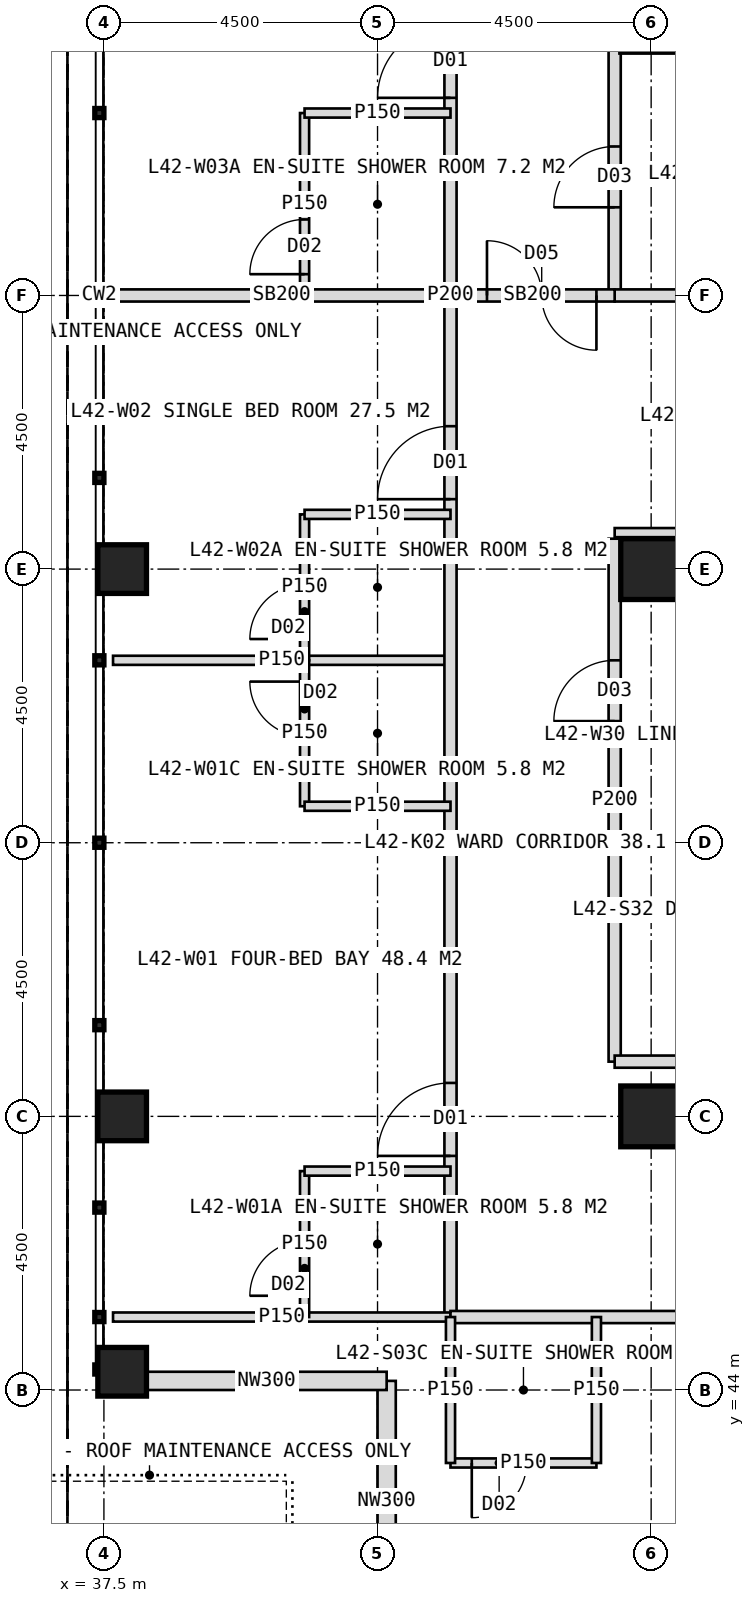
"""IFC4 building model, lengths in metres.
Left out: names, types, materials, properties, quantities, classifications, styles, units other than length and angle.
Written with IfcOpenShell. Run it as: python <this file> out.ifc"""

import sys

from ifc_helpers import new_model, si_unit, direction, frame, frame_2d, origin, origin_2d, place, context, subcontext, project, spatial, rectangle, hollow_rectangle, extrude, element, fill, save


model = new_model("IFC4")
c1 = context("Model", 3, precision=1e-05, world=origin(), true_north=direction((0.0, 1.0)))
c2 = subcontext(c1, "Body", "Model", "MODEL_VIEW")
j1 = project(units=[si_unit("LENGTHUNIT", "METRE"), si_unit("PLANEANGLEUNIT", "RADIAN")], contexts=[c1])
p1 = place(None, origin())
s1 = spatial("IfcSite", under=j1, at=p1, CompositionType="ELEMENT")
p2 = place(p1, origin())
s2 = spatial("IfcBuilding", under=s1, at=p2, CompositionType="ELEMENT")
p3 = place(p2, frame((0.0, 0.0, 177.0)))
s3 = spatial("IfcBuildingStorey", under=s2, at=p3, CompositionType="ELEMENT", Elevation=177.0)
for number, where, z_axis, x_axis in (
    (1, (46.5, 48.5, 0.0), (0.0, 0.0, 1.0), (1.0, 0.0, 0.0)),
    (2, (46.5, 57.5, 0.0), (0.0, 0.0, 1.0), (1.0, 0.0, 0.0)),
):
    element("IfcColumn", number, at=place(p3, frame(where, z_axis=z_axis, x_axis=x_axis)), inside=s3, PredefinedType="COLUMN", context=c2, shape_type="SweptSolid", body=[
        extrude(hollow_rectangle(XDim=1.0, YDim=1.0, WallThickness=0.1, at=origin_2d()), origin(), (0.0, 0.0, 1.0), 4.0),
    ])
for number, where, z_axis, x_axis in (
    (3, (37.8, 44.3, 0.0), (0.0, 0.0, 1.0), (1.0, 0.0, 0.0)),
    (4, (37.8, 48.5, 0.0), (0.0, 0.0, 1.0), (1.0, 0.0, 0.0)),
    (5, (37.8, 57.5, 0.0), (0.0, 0.0, 1.0), (1.0, 0.0, 0.0)),
):
    element("IfcColumn", number, at=place(p3, frame(where, z_axis=z_axis, x_axis=x_axis)), inside=s3, PredefinedType="COLUMN", context=c2, shape_type="SweptSolid", body=[
        extrude(hollow_rectangle(XDim=0.8, YDim=0.8, WallThickness=0.08, at=origin_2d()), origin(), (0.0, 0.0, 1.0), 4.0),
    ])
for number, where, z_axis, x_axis in (
    (6, (42.15, 40.2, 0.0), (0.0, 0.0, 1.0), (0.0, 1.0, 0.0)),
    (7, (42.15, 44.15, 0.0), (0.0, 0.0, 1.0), (-1.0, 0.0, 0.0)),
):
    element("IfcWall", number, at=place(p3, frame(where, z_axis=z_axis, x_axis=x_axis)), inside=s3, PredefinedType="ELEMENTEDWALL", context=c2, shape_type="SweptSolid", body=[
        extrude(rectangle(XDim=3.95, YDim=0.3, at=frame_2d((1.975, 0.0))), origin(), (0.0, 0.0, 1.0), 2.85),
    ])
p4 = place(p3, frame((43.2, 56.0, 0.0), z_axis=(0.0, 0.0, 1.0), x_axis=(-1.0, 0.0, 0.0)))
e8 = element("IfcWall", 8, at=p4, inside=s3, PredefinedType="PARTITIONING", context=c2, shape_type="SweptSolid", body=[
    extrude(rectangle(XDim=5.55, YDim=0.15, at=frame_2d((2.775, 0.0))), origin(), (0.0, 0.0, 1.0), 3.75),
])
p5 = place(p3, frame((43.2, 62.0, 0.0), z_axis=(0.0, 0.0, 1.0), x_axis=(-1.0, 0.0, 0.0)))
e9 = element("IfcWall", 9, at=p5, inside=s3, PredefinedType="SOLIDWALL", context=c2, shape_type="SweptSolid", body=[
    extrude(rectangle(XDim=5.55, YDim=0.2, at=frame_2d((2.775, 0.0))), origin(), (0.0, 0.0, 1.0), 2.95),
])
p6 = place(p3, frame((43.2, 45.2, 0.0), z_axis=(0.0, 0.0, 1.0), x_axis=(0.0, 1.0, 0.0)))
e10 = element("IfcWall", 10, at=p6, inside=s3, PredefinedType="PARTITIONING", context=c2, shape_type="SweptSolid", body=[
    extrude(rectangle(XDim=33.6, YDim=0.2, at=frame_2d((16.8, 0.0))), origin(), (0.0, 0.0, 1.0), 3.75),
])
p7 = place(p6, frame((2.65, 0.0, 0.0)))
e11 = element("IfcOpeningElement", 11, at=p7, cuts=e10, PredefinedType="OPENING", context=c2, shape_type="SweptSolid", body=[
    extrude(rectangle(XDim=1.2, YDim=2.2, at=frame_2d((0.6, 1.1))), frame((0.0, 0.11, 0.0), z_axis=(0.0, -1.0, 0.0), x_axis=(1.0, 0.0, 0.0)), (0.0, 0.0, 1.0), 0.22),
])
p8 = place(p6, frame((13.45, 0.0, 0.0)))
e12 = element("IfcOpeningElement", 12, at=p8, cuts=e10, PredefinedType="OPENING", context=c2, shape_type="SweptSolid", body=[
    extrude(rectangle(XDim=1.2, YDim=2.2, at=frame_2d((0.6, 1.1))), frame((0.0, 0.11, 0.0), z_axis=(0.0, -1.0, 0.0), x_axis=(1.0, 0.0, 0.0)), (0.0, 0.0, 1.0), 0.22),
])
p9 = place(p6, frame((20.05, 0.0, 0.0)))
e13 = element("IfcOpeningElement", 13, at=p9, cuts=e10, PredefinedType="OPENING", context=c2, shape_type="SweptSolid", body=[
    extrude(rectangle(XDim=1.2, YDim=2.2, at=frame_2d((0.6, 1.1))), frame((0.0, 0.11, 0.0), z_axis=(0.0, -1.0, 0.0), x_axis=(1.0, 0.0, 0.0)), (0.0, 0.0, 1.0), 0.22),
])
p10 = place(p6, frame((29.05, 0.0, 0.0)))
e14 = element("IfcOpeningElement", 14, at=p10, cuts=e10, PredefinedType="OPENING", context=c2, shape_type="SweptSolid", body=[
    extrude(rectangle(XDim=1.2, YDim=2.2, at=frame_2d((0.6, 1.1))), frame((0.0, 0.11, 0.0), z_axis=(0.0, -1.0, 0.0), x_axis=(1.0, 0.0, 0.0)), (0.0, 0.0, 1.0), 0.22),
])
p11 = place(p3, frame((43.2, 45.2, 0.0), z_axis=(0.0, 0.0, 1.0), x_axis=(-1.0, 0.0, 0.0)))
e15 = element("IfcWall", 15, at=p11, inside=s3, PredefinedType="PARTITIONING", context=c2, shape_type="SweptSolid", body=[
    extrude(rectangle(XDim=5.55, YDim=0.15, at=frame_2d((2.775, 0.0))), origin(), (0.0, 0.0, 1.0), 3.75),
])
p12 = place(p3, frame((40.8, 45.2, 0.0), z_axis=(0.0, 0.0, 1.0), x_axis=(0.0, 1.0, 0.0)))
e16 = element("IfcWall", 16, at=p12, inside=s3, PredefinedType="PARTITIONING", context=c2, shape_type="SweptSolid", body=[
    extrude(rectangle(XDim=2.4, YDim=0.15, at=frame_2d((1.2, 0.0))), origin(), (0.0, 0.0, 1.0), 3.75),
])
p13 = place(p12, frame((0.35, 0.0, 0.0)))
e17 = element("IfcOpeningElement", 17, at=p13, cuts=e16, PredefinedType="OPENING", context=c2, shape_type="SweptSolid", body=[
    extrude(rectangle(XDim=0.9, YDim=2.1, at=frame_2d((0.45, 1.05))), frame((0.0, 0.085, 0.0), z_axis=(0.0, -1.0, 0.0), x_axis=(1.0, 0.0, 0.0)), (0.0, 0.0, 1.0), 0.17),
])
p14 = place(p3, frame((43.2, 47.6, 0.0), z_axis=(0.0, 0.0, 1.0), x_axis=(-1.0, 0.0, 0.0)))
e18 = element("IfcWall", 18, at=p14, inside=s3, PredefinedType="PARTITIONING", context=c2, shape_type="SweptSolid", body=[
    extrude(rectangle(XDim=2.4, YDim=0.15, at=frame_2d((1.2, 0.0))), origin(), (0.0, 0.0, 1.0), 3.75),
])
p15 = place(p3, frame((40.8, 53.6, 0.0), z_axis=(0.0, 0.0, 1.0), x_axis=(0.0, 1.0, 0.0)))
e19 = element("IfcWall", 19, at=p15, inside=s3, PredefinedType="PARTITIONING", context=c2, shape_type="SweptSolid", body=[
    extrude(rectangle(XDim=2.4, YDim=0.15, at=frame_2d((1.2, 0.0))), origin(), (0.0, 0.0, 1.0), 3.75),
])
p16 = place(p15, frame((1.15, 0.0, 0.0)))
e20 = element("IfcOpeningElement", 20, at=p16, cuts=e19, PredefinedType="OPENING", context=c2, shape_type="SweptSolid", body=[
    extrude(rectangle(XDim=0.9, YDim=2.1, at=frame_2d((0.45, 1.05))), frame((0.0, 0.085, 0.0), z_axis=(0.0, -1.0, 0.0), x_axis=(1.0, 0.0, 0.0)), (0.0, 0.0, 1.0), 0.17),
])
p17 = place(p3, frame((43.2, 53.6, 0.0), z_axis=(0.0, 0.0, 1.0), x_axis=(-1.0, 0.0, 0.0)))
e21 = element("IfcWall", 21, at=p17, inside=s3, PredefinedType="PARTITIONING", context=c2, shape_type="SweptSolid", body=[
    extrude(rectangle(XDim=2.4, YDim=0.15, at=frame_2d((1.2, 0.0))), origin(), (0.0, 0.0, 1.0), 3.75),
])
p18 = place(p3, frame((40.8, 56.0, 0.0), z_axis=(0.0, 0.0, 1.0), x_axis=(0.0, 1.0, 0.0)))
e22 = element("IfcWall", 22, at=p18, inside=s3, PredefinedType="PARTITIONING", context=c2, shape_type="SweptSolid", body=[
    extrude(rectangle(XDim=2.4, YDim=0.15, at=frame_2d((1.2, 0.0))), origin(), (0.0, 0.0, 1.0), 3.75),
])
p19 = place(p18, frame((0.35, 0.0, 0.0)))
e23 = element("IfcOpeningElement", 23, at=p19, cuts=e22, PredefinedType="OPENING", context=c2, shape_type="SweptSolid", body=[
    extrude(rectangle(XDim=0.9, YDim=2.1, at=frame_2d((0.45, 1.05))), frame((0.0, 0.085, 0.0), z_axis=(0.0, -1.0, 0.0), x_axis=(1.0, 0.0, 0.0)), (0.0, 0.0, 1.0), 0.17),
])
p20 = place(p3, frame((43.2, 58.4, 0.0), z_axis=(0.0, 0.0, 1.0), x_axis=(-1.0, 0.0, 0.0)))
e24 = element("IfcWall", 24, at=p20, inside=s3, PredefinedType="PARTITIONING", context=c2, shape_type="SweptSolid", body=[
    extrude(rectangle(XDim=2.4, YDim=0.15, at=frame_2d((1.2, 0.0))), origin(), (0.0, 0.0, 1.0), 3.75),
])
p21 = place(p3, frame((40.8, 62.0, 0.0), z_axis=(0.0, 0.0, 1.0), x_axis=(0.0, 1.0, 0.0)))
e25 = element("IfcWall", 25, at=p21, inside=s3, PredefinedType="PARTITIONING", context=c2, shape_type="SweptSolid", body=[
    extrude(rectangle(XDim=3.0, YDim=0.15, at=frame_2d((1.5, 0.0))), origin(), (0.0, 0.0, 1.0), 3.75),
])
p22 = place(p21, frame((0.35, 0.0, 0.0)))
e26 = element("IfcOpeningElement", 26, at=p22, cuts=e25, PredefinedType="OPENING", context=c2, shape_type="SweptSolid", body=[
    extrude(rectangle(XDim=0.9, YDim=2.1, at=frame_2d((0.45, 1.05))), frame((0.0, 0.085, 0.0), z_axis=(0.0, -1.0, 0.0), x_axis=(1.0, 0.0, 0.0)), (0.0, 0.0, 1.0), 0.17),
])
p23 = place(p3, frame((43.2, 65.0, 0.0), z_axis=(0.0, 0.0, 1.0), x_axis=(-1.0, 0.0, 0.0)))
e27 = element("IfcWall", 27, at=p23, inside=s3, PredefinedType="PARTITIONING", context=c2, shape_type="SweptSolid", body=[
    extrude(rectangle(XDim=2.4, YDim=0.15, at=frame_2d((1.2, 0.0))), origin(), (0.0, 0.0, 1.0), 3.75),
])
p24 = place(p3, frame((51.0, 53.0, 0.0), z_axis=(0.0, 0.0, 1.0), x_axis=(-1.0, 0.0, 0.0)))
e28 = element("IfcWall", 28, at=p24, inside=s3, PredefinedType="PARTITIONING", context=c2, shape_type="SweptSolid", body=[
    extrude(rectangle(XDim=5.1, YDim=0.15, at=frame_2d((2.55, 0.0))), origin(), (0.0, 0.0, 1.0), 3.75),
])
p25 = place(p3, frame((45.9, 49.4, 0.0), z_axis=(0.0, 0.0, 1.0), x_axis=(0.0, 1.0, 0.0)))
e29 = element("IfcWall", 29, at=p25, inside=s3, PredefinedType="PARTITIONING", context=c2, shape_type="SweptSolid", body=[
    extrude(rectangle(XDim=8.6, YDim=0.2, at=frame_2d((4.3, 0.0))), origin(), (0.0, 0.0, 1.0), 3.75),
])
p26 = place(p25, frame((5.6, 0.0, 0.0)))
e30 = element("IfcOpeningElement", 30, at=p26, cuts=e29, PredefinedType="OPENING", context=c2, shape_type="SweptSolid", body=[
    extrude(rectangle(XDim=1.0, YDim=2.1, at=frame_2d((0.5, 1.05))), frame((0.0, 0.11, 0.0), z_axis=(0.0, -1.0, 0.0), x_axis=(1.0, 0.0, 0.0)), (0.0, 0.0, 1.0), 0.22),
])
p27 = place(p3, frame((45.9, 62.0, 0.0), z_axis=(0.0, 0.0, 1.0), x_axis=(0.0, 1.0, 0.0)))
e31 = element("IfcWall", 31, at=p27, inside=s3, PredefinedType="PARTITIONING", context=c2, shape_type="SweptSolid", body=[
    extrude(rectangle(XDim=14.1, YDim=0.2, at=frame_2d((7.05, 0.0))), origin(), (0.0, 0.0, 1.0), 3.75),
])
p28 = place(p27, frame((1.45, 0.0, 0.0)))
e32 = element("IfcOpeningElement", 32, at=p28, cuts=e31, PredefinedType="OPENING", context=c2, shape_type="SweptSolid", body=[
    extrude(rectangle(XDim=1.0, YDim=2.1, at=frame_2d((0.5, 1.05))), frame((0.0, 0.11, 0.0), z_axis=(0.0, -1.0, 0.0), x_axis=(1.0, 0.0, 0.0)), (0.0, 0.0, 1.0), 0.22),
])
p29 = place(p27, frame((10.3, 0.0, 0.0)))
e33 = element("IfcOpeningElement", 33, at=p29, cuts=e31, PredefinedType="OPENING", context=c2, shape_type="SweptSolid", body=[
    extrude(rectangle(XDim=1.0, YDim=2.1, at=frame_2d((0.5, 1.05))), frame((0.0, 0.11, 0.0), z_axis=(0.0, -1.0, 0.0), x_axis=(1.0, 0.0, 0.0)), (0.0, 0.0, 1.0), 0.22),
])
p30 = place(p3, frame((51.0, 58.1, 0.0), z_axis=(0.0, 0.0, 1.0), x_axis=(-1.0, 0.0, 0.0)))
e34 = element("IfcWall", 34, at=p30, inside=s3, PredefinedType="PARTITIONING", context=c2, shape_type="SweptSolid", body=[
    extrude(rectangle(XDim=5.1, YDim=0.15, at=frame_2d((2.55, 0.0))), origin(), (0.0, 0.0, 1.0), 3.75),
])
p31 = place(p30, frame((0.6, 0.0, 0.0)))
e35 = element("IfcOpeningElement", 35, at=p31, cuts=e34, PredefinedType="OPENING", context=c2, shape_type="SweptSolid", body=[
    extrude(rectangle(XDim=0.9, YDim=2.1, at=frame_2d((0.45, 1.05))), frame((0.0, 0.085, 0.0), z_axis=(0.0, -1.0, 0.0), x_axis=(1.0, 0.0, 0.0)), (0.0, 0.0, 1.0), 0.17),
])
p32 = place(p3, frame((51.0, 62.0, 0.0), z_axis=(0.0, 0.0, 1.0), x_axis=(-1.0, 0.0, 0.0)))
e36 = element("IfcWall", 36, at=p32, inside=s3, PredefinedType="SOLIDWALL", context=c2, shape_type="SweptSolid", body=[
    extrude(rectangle(XDim=5.1, YDim=0.2, at=frame_2d((2.55, 0.0))), origin(), (0.0, 0.0, 1.0), 2.95),
])
p33 = place(p3, frame((76.8, 45.2, 0.0), z_axis=(0.0, 0.0, 1.0), x_axis=(-1.0, 0.0, 0.0)))
e37 = element("IfcWall", 37, at=p33, inside=s3, PredefinedType="PARTITIONING", context=c2, shape_type="SweptSolid", body=[
    extrude(rectangle(XDim=33.6, YDim=0.2, at=frame_2d((16.8, 0.0))), origin(), (0.0, 0.0, 1.0), 3.75),
])
p34 = place(p33, frame((2.65, 0.0, 0.0)))
e38 = element("IfcOpeningElement", 38, at=p34, cuts=e37, PredefinedType="OPENING", context=c2, shape_type="SweptSolid", body=[
    extrude(rectangle(XDim=1.2, YDim=2.2, at=frame_2d((0.6, 1.1))), frame((0.0, 0.11, 0.0), z_axis=(0.0, -1.0, 0.0), x_axis=(1.0, 0.0, 0.0)), (0.0, 0.0, 1.0), 0.22),
])
p35 = place(p33, frame((14.05, 0.0, 0.0)))
e39 = element("IfcOpeningElement", 39, at=p35, cuts=e37, PredefinedType="OPENING", context=c2, shape_type="SweptSolid", body=[
    extrude(rectangle(XDim=1.2, YDim=2.2, at=frame_2d((0.6, 1.1))), frame((0.0, 0.11, 0.0), z_axis=(0.0, -1.0, 0.0), x_axis=(1.0, 0.0, 0.0)), (0.0, 0.0, 1.0), 0.22),
])
p36 = place(p33, frame((22.45, 0.0, 0.0)))
e40 = element("IfcOpeningElement", 40, at=p36, cuts=e37, PredefinedType="OPENING", context=c2, shape_type="SweptSolid", body=[
    extrude(rectangle(XDim=1.2, YDim=2.2, at=frame_2d((0.6, 1.1))), frame((0.0, 0.11, 0.0), z_axis=(0.0, -1.0, 0.0), x_axis=(1.0, 0.0, 0.0)), (0.0, 0.0, 1.0), 0.22),
])
p37 = place(p3, frame((45.6, 42.8, 0.0), z_axis=(0.0, 0.0, 1.0), x_axis=(-1.0, 0.0, 0.0)))
e41 = element("IfcWall", 41, at=p37, inside=s3, PredefinedType="PARTITIONING", context=c2, shape_type="SweptSolid", body=[
    extrude(rectangle(XDim=2.4, YDim=0.15, at=frame_2d((1.2, 0.0))), origin(), (0.0, 0.0, 1.0), 3.75),
])
p38 = place(p37, frame((1.15, 0.0, 0.0)))
e42 = element("IfcOpeningElement", 42, at=p38, cuts=e41, PredefinedType="OPENING", context=c2, shape_type="SweptSolid", body=[
    extrude(rectangle(XDim=0.9, YDim=2.1, at=frame_2d((0.45, 1.05))), frame((0.0, 0.085, 0.0), z_axis=(0.0, -1.0, 0.0), x_axis=(1.0, 0.0, 0.0)), (0.0, 0.0, 1.0), 0.17),
])
for number, where, z_axis, x_axis in (
    (43, (45.6, 45.2, 0.0), (0.0, 0.0, 1.0), (0.0, -1.0, 0.0)),
    (44, (43.2, 45.2, 0.0), (0.0, 0.0, 1.0), (0.0, -1.0, 0.0)),
):
    element("IfcWall", number, at=place(p3, frame(where, z_axis=z_axis, x_axis=x_axis)), inside=s3, PredefinedType="PARTITIONING", context=c2, shape_type="SweptSolid", body=[
        extrude(rectangle(XDim=2.4, YDim=0.15, at=frame_2d((1.2, 0.0))), origin(), (0.0, 0.0, 1.0), 3.75),
    ])
p39 = place(p3, frame((57.75, 49.4, 0.0), z_axis=(0.0, 0.0, 1.0), x_axis=(-1.0, 0.0, 0.0)))
e45 = element("IfcWall", 45, at=p39, inside=s3, PredefinedType="PARTITIONING", context=c2, shape_type="SweptSolid", body=[
    extrude(rectangle(XDim=11.85, YDim=0.2, at=frame_2d((5.925, 0.0))), origin(), (0.0, 0.0, 1.0), 3.75),
])
p40 = place(p39, frame((4.3, 0.0, 0.0)))
e46 = element("IfcOpeningElement", 46, at=p40, cuts=e45, PredefinedType="OPENING", context=c2, shape_type="SweptSolid", body=[
    extrude(rectangle(XDim=1.0, YDim=2.1, at=frame_2d((0.5, 1.05))), frame((0.0, 0.11, 0.0), z_axis=(0.0, -1.0, 0.0), x_axis=(1.0, 0.0, 0.0)), (0.0, 0.0, 1.0), 0.22),
])
p41 = place(p39, frame((8.8, 0.0, 0.0)))
e47 = element("IfcOpeningElement", 47, at=p41, cuts=e45, PredefinedType="OPENING", context=c2, shape_type="SweptSolid", body=[
    extrude(rectangle(XDim=1.0, YDim=2.1, at=frame_2d((0.5, 1.05))), frame((0.0, 0.11, 0.0), z_axis=(0.0, -1.0, 0.0), x_axis=(1.0, 0.0, 0.0)), (0.0, 0.0, 1.0), 0.22),
])
p42 = place(p3, frame((45.9, 62.0, 0.0), z_axis=(0.0, 0.0, 1.0), x_axis=(-1.0, 0.0, 0.0)))
e48 = element("IfcWall", 48, at=p42, inside=s3, PredefinedType="SOLIDWALL", context=c2, shape_type="SweptSolid", body=[
    extrude(rectangle(XDim=2.7, YDim=0.2, at=frame_2d((1.35, 0.0))), origin(), (0.0, 0.0, 1.0), 2.95),
])
p43 = place(p42, frame((0.3, 0.0, 0.0)))
e49 = element("IfcOpeningElement", 49, at=p43, cuts=e48, PredefinedType="OPENING", context=c2, shape_type="SweptSolid", body=[
    extrude(rectangle(XDim=1.8, YDim=2.2, at=frame_2d((0.9, 1.1))), frame((0.0, 0.11, 0.0), z_axis=(0.0, -1.0, 0.0), x_axis=(1.0, 0.0, 0.0)), (0.0, 0.0, 1.0), 0.22),
])
p44 = place(p7, origin())
e50 = element("IfcDoor", 50, at=p44, inside=s3, OperationType="SINGLE_SWING_LEFT", PredefinedType="DOOR", context=c2, shape_type="SweptSolid", body=[
    extrude(rectangle(XDim=1.2, YDim=2.2, at=frame_2d((0.6, 1.1))), frame((0.0, 0.025, 0.0), z_axis=(0.0, -1.0, 0.0), x_axis=(1.0, 0.0, 0.0)), (0.0, 0.0, 1.0), 0.05),
])
fill(e11, e50)
p45 = place(p13, origin())
e51 = element("IfcDoor", 51, at=p45, inside=s3, OperationType="SINGLE_SWING_LEFT", PredefinedType="DOOR", context=c2, shape_type="SweptSolid", body=[
    extrude(rectangle(XDim=0.9, YDim=2.1, at=frame_2d((0.45, 1.05))), frame((0.0, 0.025, 0.0), z_axis=(0.0, -1.0, 0.0), x_axis=(1.0, 0.0, 0.0)), (0.0, 0.0, 1.0), 0.05),
])
fill(e17, e51)
p46 = place(p16, origin())
e52 = element("IfcDoor", 52, at=p46, inside=s3, OperationType="SINGLE_SWING_RIGHT", PredefinedType="DOOR", context=c2, shape_type="SweptSolid", body=[
    extrude(rectangle(XDim=0.9, YDim=2.1, at=frame_2d((0.45, 1.05))), frame((0.0, 0.025, 0.0), z_axis=(0.0, -1.0, 0.0), x_axis=(1.0, 0.0, 0.0)), (0.0, 0.0, 1.0), 0.05),
])
fill(e20, e52)
p47 = place(p8, origin())
e53 = element("IfcDoor", 53, at=p47, inside=s3, OperationType="SINGLE_SWING_LEFT", PredefinedType="DOOR", context=c2, shape_type="SweptSolid", body=[
    extrude(rectangle(XDim=1.2, YDim=2.2, at=frame_2d((0.6, 1.1))), frame((0.0, 0.025, 0.0), z_axis=(0.0, -1.0, 0.0), x_axis=(1.0, 0.0, 0.0)), (0.0, 0.0, 1.0), 0.05),
])
fill(e12, e53)
p48 = place(p19, origin())
e54 = element("IfcDoor", 54, at=p48, inside=s3, OperationType="SINGLE_SWING_LEFT", PredefinedType="DOOR", context=c2, shape_type="SweptSolid", body=[
    extrude(rectangle(XDim=0.9, YDim=2.1, at=frame_2d((0.45, 1.05))), frame((0.0, 0.025, 0.0), z_axis=(0.0, -1.0, 0.0), x_axis=(1.0, 0.0, 0.0)), (0.0, 0.0, 1.0), 0.05),
])
fill(e23, e54)
p49 = place(p9, origin())
e55 = element("IfcDoor", 55, at=p49, inside=s3, OperationType="SINGLE_SWING_LEFT", PredefinedType="DOOR", context=c2, shape_type="SweptSolid", body=[
    extrude(rectangle(XDim=1.2, YDim=2.2, at=frame_2d((0.6, 1.1))), frame((0.0, 0.025, 0.0), z_axis=(0.0, -1.0, 0.0), x_axis=(1.0, 0.0, 0.0)), (0.0, 0.0, 1.0), 0.05),
])
fill(e13, e55)
p50 = place(p22, origin())
e56 = element("IfcDoor", 56, at=p50, inside=s3, OperationType="SINGLE_SWING_LEFT", PredefinedType="DOOR", context=c2, shape_type="SweptSolid", body=[
    extrude(rectangle(XDim=0.9, YDim=2.1, at=frame_2d((0.45, 1.05))), frame((0.0, 0.025, 0.0), z_axis=(0.0, -1.0, 0.0), x_axis=(1.0, 0.0, 0.0)), (0.0, 0.0, 1.0), 0.05),
])
fill(e26, e56)
p51 = place(p26, origin())
e57 = element("IfcDoor", 57, at=p51, inside=s3, OperationType="SINGLE_SWING_LEFT", PredefinedType="DOOR", context=c2, shape_type="SweptSolid", body=[
    extrude(rectangle(XDim=1.0, YDim=2.1, at=frame_2d((0.5, 1.05))), frame((0.0, 0.025, 0.0), z_axis=(0.0, -1.0, 0.0), x_axis=(1.0, 0.0, 0.0)), (0.0, 0.0, 1.0), 0.05),
])
fill(e30, e57)
p52 = place(p28, origin())
e58 = element("IfcDoor", 58, at=p52, inside=s3, OperationType="SINGLE_SWING_LEFT", PredefinedType="DOOR", context=c2, shape_type="SweptSolid", body=[
    extrude(rectangle(XDim=1.0, YDim=2.1, at=frame_2d((0.5, 1.05))), frame((0.0, 0.025, 0.0), z_axis=(0.0, -1.0, 0.0), x_axis=(1.0, 0.0, 0.0)), (0.0, 0.0, 1.0), 0.05),
])
fill(e32, e58)
p53 = place(p38, origin())
e59 = element("IfcDoor", 59, at=p53, inside=s3, OperationType="SINGLE_SWING_RIGHT", PredefinedType="DOOR", context=c2, shape_type="SweptSolid", body=[
    extrude(rectangle(XDim=0.9, YDim=2.1, at=frame_2d((0.45, 1.05))), frame((0.0, 0.025, 0.0), z_axis=(0.0, -1.0, 0.0), x_axis=(1.0, 0.0, 0.0)), (0.0, 0.0, 1.0), 0.05),
])
fill(e42, e59)
p54 = place(p43, origin())
e60 = element("IfcDoor", 60, at=p54, inside=s3, OperationType="DOUBLE_DOOR_DOUBLE_SWING", PredefinedType="DOOR", context=c2, shape_type="SweptSolid", body=[
    extrude(rectangle(XDim=1.8, YDim=2.2, at=frame_2d((0.9, 1.1))), frame((0.0, 0.025, 0.0), z_axis=(0.0, -1.0, 0.0), x_axis=(1.0, 0.0, 0.0)), (0.0, 0.0, 1.0), 0.05),
])
fill(e49, e60)
save(model, sys.argv[1])
